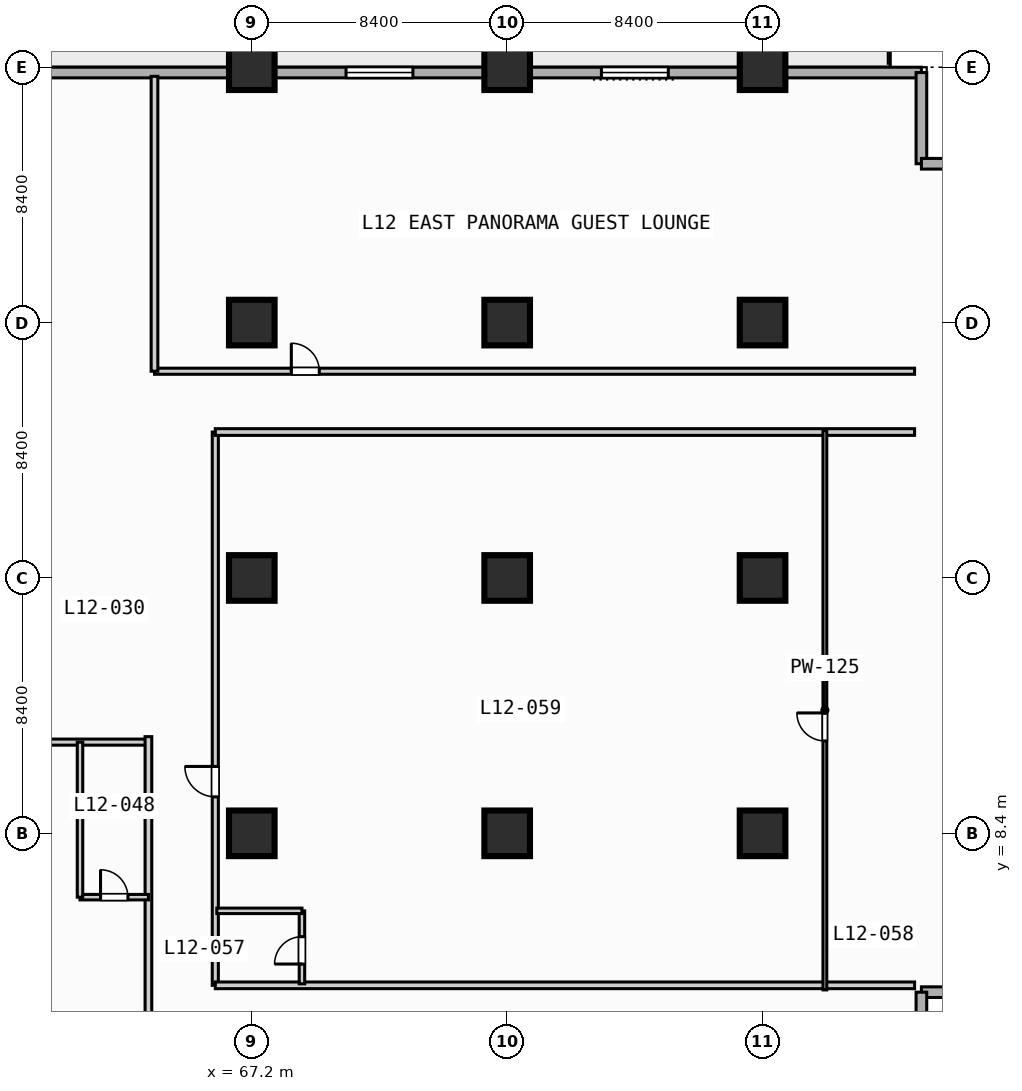
"""IFC4 building model, lengths in metres.
Left out: names, types, materials, properties, quantities, classifications, styles, units other than length and angle.
Written with IfcOpenShell. Run it as: python <this file> out.ifc"""

import sys

from ifc_helpers import new_model, si_unit, direction, frame, frame_2d, origin, origin_2d, place, context, subcontext, project, spatial, rectangle, extrude, element, fill, save


model = new_model("IFC4")
c1 = context("Model", 3, precision=1e-05, world=origin(), true_north=direction((0.0, 1.0)))
c2 = subcontext(c1, "Body", "Model", "MODEL_VIEW")
j1 = project(units=[si_unit("LENGTHUNIT", "METRE"), si_unit("PLANEANGLEUNIT", "RADIAN")], contexts=[c1])
p1 = place(None, origin())
s1 = spatial("IfcSite", under=j1, at=p1, CompositionType="ELEMENT")
p2 = place(p1, origin())
s2 = spatial("IfcBuilding", under=s1, at=p2, CompositionType="ELEMENT")
p3 = place(p2, frame((0.0, 0.0, 54.8)))
s3 = spatial("IfcBuildingStorey", under=s2, at=p3, CompositionType="ELEMENT", Elevation=54.8)
for number, where, z_axis, x_axis in (
    (1, (67.2, 8.4, 0.0), (0.0, 0.0, 1.0), (1.0, 0.0, 0.0)),
    (2, (67.2, 16.8, 0.0), (0.0, 0.0, 1.0), (1.0, 0.0, 0.0)),
    (3, (67.2, 25.2, 0.0), (0.0, 0.0, 1.0), (1.0, 0.0, 0.0)),
    (4, (67.2, 33.6, 0.0), (0.0, 0.0, 1.0), (1.0, 0.0, 0.0)),
    (5, (75.6, 8.4, 0.0), (0.0, 0.0, 1.0), (1.0, 0.0, 0.0)),
    (6, (75.6, 16.8, 0.0), (0.0, 0.0, 1.0), (1.0, 0.0, 0.0)),
    (7, (75.6, 25.2, 0.0), (0.0, 0.0, 1.0), (1.0, 0.0, 0.0)),
    (8, (75.6, 33.6, 0.0), (0.0, 0.0, 1.0), (1.0, 0.0, 0.0)),
    (9, (84.0, 8.4, 0.0), (0.0, 0.0, 1.0), (1.0, 0.0, 0.0)),
    (10, (84.0, 16.8, 0.0), (0.0, 0.0, 1.0), (1.0, 0.0, 0.0)),
    (11, (84.0, 25.2, 0.0), (0.0, 0.0, 1.0), (1.0, 0.0, 0.0)),
    (12, (84.0, 33.6, 0.0), (0.0, 0.0, 1.0), (1.0, 0.0, 0.0)),
):
    element("IfcColumn", number, at=place(p3, frame(where, z_axis=z_axis, x_axis=x_axis)), inside=s3, PredefinedType="COLUMN", context=c2, shape_type="SweptSolid", body=[
        extrude(rectangle(XDim=1.5, YDim=1.5, at=origin_2d()), origin(), (0.0, 0.0, 1.0), 3.8),
    ])
p4 = place(p3, frame((33.425, 33.425, 0.0), z_axis=(0.0, 0.0, 1.0), x_axis=(1.0, 0.0, 0.0)))
e13 = element("IfcWall", 13, at=p4, inside=s3, PredefinedType="STANDARD", context=c2, shape_type="SweptSolid", body=[
    extrude(rectangle(XDim=55.8, YDim=0.35, at=frame_2d((27.9, 0.0))), origin(), (0.0, 0.0, 1.0), 3.55),
])
p5 = place(p4, frame((12.075, 0.0, 0.0)))
e14 = element("IfcOpeningElement", 14, at=p5, cuts=e13, PredefinedType="OPENING", context=c2, shape_type="SweptSolid", body=[
    extrude(rectangle(XDim=1.4, YDim=2.2, at=frame_2d((0.7, 1.1))), frame((0.0, 0.185, 0.0), z_axis=(0.0, -1.0, 0.0), x_axis=(1.0, 0.0, 0.0)), (0.0, 0.0, 1.0), 0.37),
])
p6 = place(p4, frame((36.875, 0.0, 0.85)))
e15 = element("IfcOpeningElement", 15, at=p6, cuts=e13, PredefinedType="OPENING", context=c2, shape_type="SweptSolid", body=[
    extrude(rectangle(XDim=2.2, YDim=1.8, at=frame_2d((1.1, 0.9))), frame((0.0, 0.185, 0.0), z_axis=(0.0, -1.0, 0.0), x_axis=(1.0, 0.0, 0.0)), (0.0, 0.0, 1.0), 0.37),
])
p7 = place(p4, frame((45.275, 0.0, 0.85)))
e16 = element("IfcOpeningElement", 16, at=p7, cuts=e13, PredefinedType="OPENING", context=c2, shape_type="SweptSolid", body=[
    extrude(rectangle(XDim=2.2, YDim=1.8, at=frame_2d((1.1, 0.9))), frame((0.0, 0.185, 0.0), z_axis=(0.0, -1.0, 0.0), x_axis=(1.0, 0.0, 0.0)), (0.0, 0.0, 1.0), 0.37),
])
for number, where, z_axis, x_axis in (
    (17, (89.225, 33.425, 0.0), (0.0, 0.0, 1.0), (0.0, -1.0, 0.0)),
    (18, (89.225, 30.425, 0.0), (0.0, 0.0, 1.0), (1.0, 0.0, 0.0)),
    (19, (92.225, 3.175, 0.0), (0.0, 0.0, 1.0), (-1.0, 0.0, 0.0)),
    (20, (89.225, 3.175, 0.0), (0.0, 0.0, 1.0), (0.0, -1.0, 0.0)),
):
    element("IfcWall", number, at=place(p3, frame(where, z_axis=z_axis, x_axis=x_axis)), inside=s3, PredefinedType="STANDARD", context=c2, shape_type="SweptSolid", body=[
        extrude(rectangle(XDim=3.0, YDim=0.35, at=frame_2d((1.5, 0.0))), origin(), (0.0, 0.0, 1.0), 3.55),
    ])
p8 = place(p3, frame((13.5, 11.4, 0.0), z_axis=(0.0, 0.0, 1.0), x_axis=(1.0, 0.0, 0.0)))
e21 = element("IfcWall", 21, at=p8, inside=s3, PredefinedType="PARTITIONING", context=c2, shape_type="SweptSolid", body=[
    extrude(rectangle(XDim=50.3, YDim=0.2, at=frame_2d((25.15, 0.0))), origin(), (0.0, 0.0, 1.0), 3.55),
])
p9 = place(p8, frame((2.135, 0.0, 0.0)))
e22 = element("IfcOpeningElement", 22, at=p9, cuts=e21, PredefinedType="OPENING", context=c2, shape_type="SweptSolid", body=[
    extrude(rectangle(XDim=1.0, YDim=2.15, at=frame_2d((0.5, 1.075))), frame((0.0, 0.11, 0.0), z_axis=(0.0, -1.0, 0.0), x_axis=(1.0, 0.0, 0.0)), (0.0, 0.0, 1.0), 0.22),
])
p10 = place(p8, frame((14.665, 0.0, 0.0)))
e23 = element("IfcOpeningElement", 23, at=p10, cuts=e21, PredefinedType="OPENING", context=c2, shape_type="SweptSolid", body=[
    extrude(rectangle(XDim=1.0, YDim=2.15, at=frame_2d((0.5, 1.075))), frame((0.0, 0.11, 0.0), z_axis=(0.0, -1.0, 0.0), x_axis=(1.0, 0.0, 0.0)), (0.0, 0.0, 1.0), 0.22),
])
p11 = place(p8, frame((22.31, 0.0, 0.0)))
e24 = element("IfcOpeningElement", 24, at=p11, cuts=e21, PredefinedType="OPENING", context=c2, shape_type="SweptSolid", body=[
    extrude(rectangle(XDim=1.0, YDim=2.15, at=frame_2d((0.5, 1.075))), frame((0.0, 0.11, 0.0), z_axis=(0.0, -1.0, 0.0), x_axis=(1.0, 0.0, 0.0)), (0.0, 0.0, 1.0), 0.22),
])
p12 = place(p8, frame((32.51, 0.0, 0.0)))
e25 = element("IfcOpeningElement", 25, at=p12, cuts=e21, PredefinedType="OPENING", context=c2, shape_type="SweptSolid", body=[
    extrude(rectangle(XDim=1.0, YDim=2.15, at=frame_2d((0.5, 1.075))), frame((0.0, 0.11, 0.0), z_axis=(0.0, -1.0, 0.0), x_axis=(1.0, 0.0, 0.0)), (0.0, 0.0, 1.0), 0.22),
])
p13 = place(p8, frame((43.885, 0.0, 0.0)))
e26 = element("IfcOpeningElement", 26, at=p13, cuts=e21, PredefinedType="OPENING", context=c2, shape_type="SweptSolid", body=[
    extrude(rectangle(XDim=1.0, YDim=2.15, at=frame_2d((0.5, 1.075))), frame((0.0, 0.11, 0.0), z_axis=(0.0, -1.0, 0.0), x_axis=(1.0, 0.0, 0.0)), (0.0, 0.0, 1.0), 0.22),
])
p14 = place(p3, frame((63.8, 0.2, 0.0), z_axis=(0.0, 0.0, 1.0), x_axis=(0.0, 1.0, 0.0)))
e27 = element("IfcWall", 27, at=p14, inside=s3, PredefinedType="PARTITIONING", context=c2, shape_type="SweptSolid", body=[
    extrude(rectangle(XDim=11.38, YDim=0.22, at=frame_2d((5.69, 0.0))), origin(), (0.0, 0.0, 1.0), 3.55),
])
p15 = place(p3, frame((61.55, 6.3, 0.0), z_axis=(0.0, 0.0, 1.0), x_axis=(1.0, 0.0, 0.0)))
e28 = element("IfcWall", 28, at=p15, inside=s3, PredefinedType="PLUMBINGWALL", context=c2, shape_type="SweptSolid", body=[
    extrude(rectangle(XDim=2.25, YDim=0.18, at=frame_2d((1.125, 0.0))), origin(), (0.0, 0.0, 1.0), 3.55),
])
p16 = place(p15, frame((0.675, 0.0, 0.0)))
e29 = element("IfcOpeningElement", 29, at=p16, cuts=e28, PredefinedType="OPENING", context=c2, shape_type="SweptSolid", body=[
    extrude(rectangle(XDim=0.9, YDim=2.1, at=frame_2d((0.45, 1.05))), frame((0.0, 0.1, 0.0), z_axis=(0.0, -1.0, 0.0), x_axis=(1.0, 0.0, 0.0)), (0.0, 0.0, 1.0), 0.2),
])
p17 = place(p3, frame((61.55, 6.3, 0.0), z_axis=(0.0, 0.0, 1.0), x_axis=(0.0, 1.0, 0.0)))
e30 = element("IfcWall", 30, at=p17, inside=s3, PredefinedType="PLUMBINGWALL", context=c2, shape_type="SweptSolid", body=[
    extrude(rectangle(XDim=5.1, YDim=0.18, at=frame_2d((2.55, 0.0))), origin(), (0.0, 0.0, 1.0), 3.55),
])
p18 = place(p3, frame((66.0, 3.4, 0.0), z_axis=(0.0, 0.0, 1.0), x_axis=(0.0, 1.0, 0.0)))
e31 = element("IfcWall", 31, at=p18, inside=s3, PredefinedType="PARTITIONING", context=c2, shape_type="SweptSolid", body=[
    extrude(rectangle(XDim=18.2, YDim=0.2, at=frame_2d((9.1, 0.0))), origin(), (0.0, 0.0, 1.0), 3.55),
])
p19 = place(p18, frame((6.2, 0.0, 0.0)))
e32 = element("IfcOpeningElement", 32, at=p19, cuts=e31, PredefinedType="OPENING", context=c2, shape_type="SweptSolid", body=[
    extrude(rectangle(XDim=1.0, YDim=2.15, at=frame_2d((0.5, 1.075))), frame((0.0, 0.11, 0.0), z_axis=(0.0, -1.0, 0.0), x_axis=(1.0, 0.0, 0.0)), (0.0, 0.0, 1.0), 0.22),
])
for number, where, z_axis, x_axis in (
    (33, (66.0, 3.4, 0.0), (0.0, 0.0, 1.0), (1.0, 0.0, 0.0)),
    (34, (66.0, 21.6, 0.0), (0.0, 0.0, 1.0), (1.0, 0.0, 0.0)),
):
    element("IfcWall", number, at=place(p3, frame(where, z_axis=z_axis, x_axis=x_axis)), inside=s3, PredefinedType="PARTITIONING", context=c2, shape_type="SweptSolid", body=[
        extrude(rectangle(XDim=23.0, YDim=0.22, at=frame_2d((11.5, 0.0))), origin(), (0.0, 0.0, 1.0), 3.55),
    ])
p20 = place(p3, frame((68.85, 3.45, 0.0), z_axis=(0.0, 0.0, 1.0), x_axis=(0.0, 1.0, 0.0)))
e35 = element("IfcWall", 35, at=p20, inside=s3, PredefinedType="PLUMBINGWALL", context=c2, shape_type="SweptSolid", body=[
    extrude(rectangle(XDim=2.4, YDim=0.18, at=frame_2d((1.2, 0.0))), origin(), (0.0, 0.0, 1.0), 3.55),
])
p21 = place(p20, frame((0.65, 0.0, 0.0)))
e36 = element("IfcOpeningElement", 36, at=p21, cuts=e35, PredefinedType="OPENING", context=c2, shape_type="SweptSolid", body=[
    extrude(rectangle(XDim=0.9, YDim=2.1, at=frame_2d((0.45, 1.05))), frame((0.0, 0.1, 0.0), z_axis=(0.0, -1.0, 0.0), x_axis=(1.0, 0.0, 0.0)), (0.0, 0.0, 1.0), 0.2),
])
p22 = place(p3, frame((66.05, 5.85, 0.0), z_axis=(0.0, 0.0, 1.0), x_axis=(1.0, 0.0, 0.0)))
e37 = element("IfcWall", 37, at=p22, inside=s3, PredefinedType="PLUMBINGWALL", context=c2, shape_type="SweptSolid", body=[
    extrude(rectangle(XDim=2.8, YDim=0.18, at=frame_2d((1.4, 0.0))), origin(), (0.0, 0.0, 1.0), 3.55),
])
p23 = place(p3, frame((86.05, 3.25, 0.0), z_axis=(0.0, 0.0, 1.0), x_axis=(0.0, 1.0, 0.0)))
e38 = element("IfcWall", 38, at=p23, inside=s3, PredefinedType="PARTITIONING", context=c2, shape_type="SweptSolid", body=[
    extrude(rectangle(XDim=18.4, YDim=0.125, at=frame_2d((9.2, 0.0))), origin(), (0.0, 0.0, 1.0), 3.55),
])
p24 = place(p23, frame((8.19, 0.0, 0.0)))
e39 = element("IfcOpeningElement", 39, at=p24, cuts=e38, PredefinedType="OPENING", context=c2, shape_type="SweptSolid", body=[
    extrude(rectangle(XDim=0.92, YDim=2.1, at=frame_2d((0.46, 1.05))), frame((0.0, 0.073, 0.0), z_axis=(0.0, -1.0, 0.0), x_axis=(1.0, 0.0, 0.0)), (0.0, 0.0, 1.0), 0.145),
])
p25 = place(p3, frame((64.0, 23.6, 0.0), z_axis=(0.0, 0.0, 1.0), x_axis=(1.0, 0.0, 0.0)))
e40 = element("IfcWall", 40, at=p25, inside=s3, PredefinedType="PARTITIONING", context=c2, shape_type="SweptSolid", body=[
    extrude(rectangle(XDim=25.0, YDim=0.2, at=frame_2d((12.5, 0.0))), origin(), (0.0, 0.0, 1.0), 3.55),
])
p26 = place(p25, frame((4.5, 0.0, 0.0)))
e41 = element("IfcOpeningElement", 41, at=p26, cuts=e40, PredefinedType="OPENING", context=c2, shape_type="SweptSolid", body=[
    extrude(rectangle(XDim=0.92, YDim=2.1, at=frame_2d((0.46, 1.05))), frame((0.0, 0.11, 0.0), z_axis=(0.0, -1.0, 0.0), x_axis=(1.0, 0.0, 0.0)), (0.0, 0.0, 1.0), 0.22),
])
p27 = place(p3, frame((64.0, 23.6, 0.0), z_axis=(0.0, 0.0, 1.0), x_axis=(0.0, 1.0, 0.0)))
e42 = element("IfcWall", 42, at=p27, inside=s3, PredefinedType="PARTITIONING", context=c2, shape_type="SweptSolid", body=[
    extrude(rectangle(XDim=9.7, YDim=0.22, at=frame_2d((4.85, 0.0))), origin(), (0.0, 0.0, 1.0), 3.55),
])
p28 = place(p6, origin())
e43 = element("IfcWindow", 43, at=p28, inside=s3, PartitioningType="SINGLE_PANEL", PredefinedType="WINDOW", context=c2, shape_type="SweptSolid", body=[
    extrude(rectangle(XDim=2.2, YDim=1.8, at=frame_2d((1.1, 0.9))), frame((0.0, 0.03, 0.0), z_axis=(0.0, -1.0, 0.0), x_axis=(1.0, 0.0, 0.0)), (0.0, 0.0, 1.0), 0.06),
])
fill(e15, e43)
p29 = place(p7, origin())
e44 = element("IfcWindow", 44, at=p29, inside=s3, PartitioningType="SINGLE_PANEL", PredefinedType="WINDOW", context=c2, shape_type="SweptSolid", body=[
    extrude(rectangle(XDim=2.2, YDim=1.8, at=frame_2d((1.1, 0.9))), frame((0.0, 0.03, 0.0), z_axis=(0.0, -1.0, 0.0), x_axis=(1.0, 0.0, 0.0)), (0.0, 0.0, 1.0), 0.06),
])
fill(e16, e44)
p30 = place(p16, origin())
e45 = element("IfcDoor", 45, at=p30, inside=s3, OperationType="SINGLE_SWING_LEFT", PredefinedType="DOOR", context=c2, shape_type="SweptSolid", body=[
    extrude(rectangle(XDim=0.9, YDim=2.1, at=frame_2d((0.45, 1.05))), frame((0.0, 0.025, 0.0), z_axis=(0.0, -1.0, 0.0), x_axis=(1.0, 0.0, 0.0)), (0.0, 0.0, 1.0), 0.05),
])
fill(e29, e45)
p31 = place(p19, origin())
e46 = element("IfcDoor", 46, at=p31, inside=s3, OperationType="SINGLE_SWING_RIGHT", PredefinedType="DOOR", context=c2, shape_type="SweptSolid", body=[
    extrude(rectangle(XDim=1.0, YDim=2.15, at=frame_2d((0.5, 1.075))), frame((0.0, 0.025, 0.0), z_axis=(0.0, -1.0, 0.0), x_axis=(1.0, 0.0, 0.0)), (0.0, 0.0, 1.0), 0.05),
])
fill(e32, e46)
p32 = place(p21, origin())
e47 = element("IfcDoor", 47, at=p32, inside=s3, OperationType="SINGLE_SWING_LEFT", PredefinedType="DOOR", context=c2, shape_type="SweptSolid", body=[
    extrude(rectangle(XDim=0.9, YDim=2.1, at=frame_2d((0.45, 1.05))), frame((0.0, 0.025, 0.0), z_axis=(0.0, -1.0, 0.0), x_axis=(1.0, 0.0, 0.0)), (0.0, 0.0, 1.0), 0.05),
])
fill(e36, e47)
p33 = place(p24, origin())
e48 = element("IfcDoor", 48, at=p33, inside=s3, OperationType="SINGLE_SWING_RIGHT", PredefinedType="DOOR", context=c2, shape_type="SweptSolid", body=[
    extrude(rectangle(XDim=0.92, YDim=2.1, at=frame_2d((0.46, 1.05))), frame((0.0, 0.025, 0.0), z_axis=(0.0, -1.0, 0.0), x_axis=(1.0, 0.0, 0.0)), (0.0, 0.0, 1.0), 0.05),
])
fill(e39, e48)
p34 = place(p26, origin())
e49 = element("IfcDoor", 49, at=p34, inside=s3, OperationType="SINGLE_SWING_LEFT", PredefinedType="DOOR", context=c2, shape_type="SweptSolid", body=[
    extrude(rectangle(XDim=0.92, YDim=2.1, at=frame_2d((0.46, 1.05))), frame((0.0, 0.025, 0.0), z_axis=(0.0, -1.0, 0.0), x_axis=(1.0, 0.0, 0.0)), (0.0, 0.0, 1.0), 0.05),
])
fill(e41, e49)
save(model, sys.argv[1])
